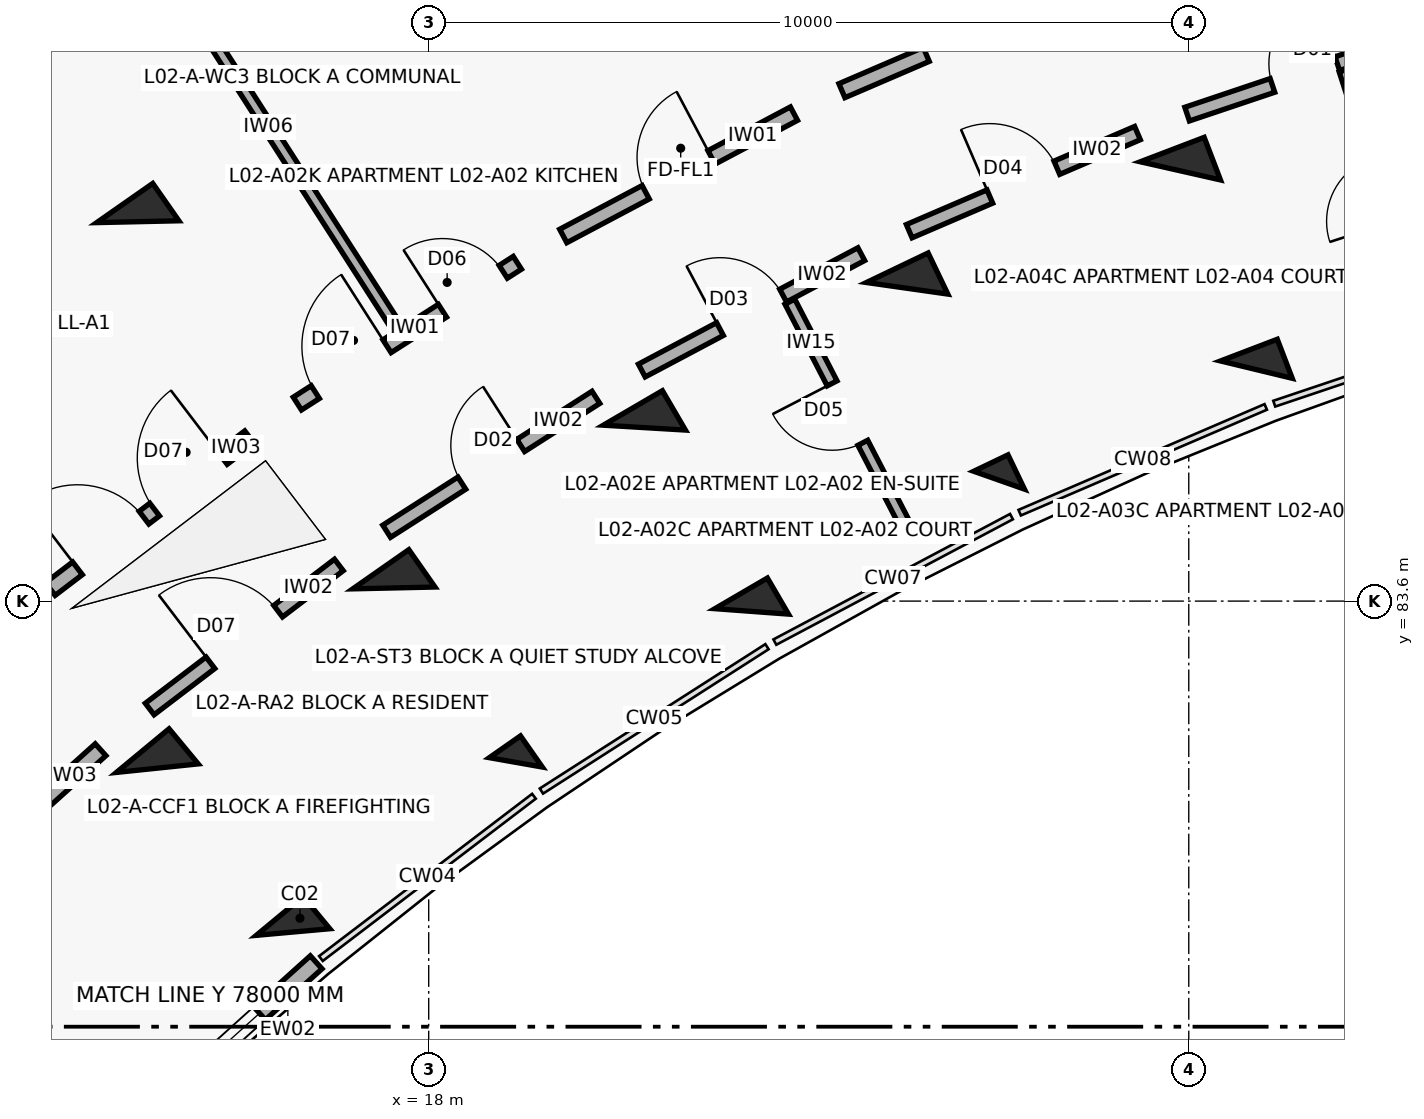
"""IFC4 building model, lengths in metres.
Left out: names, types, materials, properties, quantities, classifications, styles, units other than length and angle.
Written with IfcOpenShell. Run it as: python <this file> out.ifc"""

import sys

from ifc_helpers import new_model, si_unit, direction, frame, frame_2d, origin, origin_2d, place, context, subcontext, project, spatial, rectangle, extrude, element, fill, save


model = new_model("IFC4")
c1 = context("Model", 3, precision=1e-05, world=origin(), true_north=direction((0.0, 1.0)))
c2 = subcontext(c1, "Body", "Model", "MODEL_VIEW")
j1 = project(units=[si_unit("LENGTHUNIT", "METRE"), si_unit("PLANEANGLEUNIT", "RADIAN")], contexts=[c1])
p1 = place(None, origin())
s1 = spatial("IfcSite", under=j1, at=p1, CompositionType="ELEMENT")
p2 = place(p1, origin())
s2 = spatial("IfcBuilding", under=s1, at=p2, CompositionType="ELEMENT")
p3 = place(p2, frame((0.0, 0.0, 8.1)))
s3 = spatial("IfcBuildingStorey", under=s2, at=p3, CompositionType="ELEMENT", Elevation=8.1)
p4 = place(p3, frame((16.215, 79.245, 0.0), z_axis=(0.0, 0.0, 1.0), x_axis=(-0.637961754089, 0.770068049148, 0.0)))
e1 = element("IfcColumn", 1, at=p4, inside=s3, PredefinedType="COLUMN", context=c2, shape_type="SweptSolid", body=[
    extrude(rectangle(XDim=0.55, YDim=0.8, at=origin_2d()), origin(), (0.0, 0.0, 1.0), 3.1),
])
p5 = place(p3, frame((14.429, 81.402, 0.0), z_axis=(0.0, 0.0, 1.0), x_axis=(-0.637961754089, 0.770068049148, 0.0)))
e2 = element("IfcColumn", 2, at=p5, inside=s3, PredefinedType="COLUMN", context=c2, shape_type="SweptSolid", body=[
    extrude(rectangle(XDim=0.6, YDim=0.9, at=origin_2d()), origin(), (0.0, 0.0, 1.0), 3.1),
])
p6 = place(p3, frame((19.146, 81.478, 0.0), z_axis=(0.0, 0.0, 1.0), x_axis=(-0.573004420611, 0.819552276527, 0.0)))
e3 = element("IfcColumn", 3, at=p6, inside=s3, PredefinedType="COLUMN", context=c2, shape_type="SweptSolid", body=[
    extrude(rectangle(XDim=0.5, YDim=0.5, at=origin_2d()), origin(), (0.0, 0.0, 1.0), 3.1),
])
for number, where, z_axis, x_axis in (
    (4, (17.542, 83.773, 0.0), (0.0, 0.0, 1.0), (-0.573, 0.82, 0.0)),
    (5, (14.172, 88.592, 0.0), (0.0, 0.0, 1.0), (-0.573, 0.82, 0.0)),
):
    element("IfcColumn", number, at=place(p3, frame(where, z_axis=z_axis, x_axis=x_axis)), inside=s3, PredefinedType="COLUMN", context=c2, shape_type="SweptSolid", body=[
        extrude(rectangle(XDim=0.6, YDim=0.9, at=origin_2d()), origin(), (0.0, 0.0, 1.0), 3.1),
    ])
p7 = place(p3, frame((22.249, 83.464, 0.0), z_axis=(0.0, 0.0, 1.0), x_axis=(-0.504226211181, 0.863571611366, 0.0)))
e6 = element("IfcColumn", 6, at=p7, inside=s3, PredefinedType="COLUMN", context=c2, shape_type="SweptSolid", body=[
    extrude(rectangle(XDim=0.55, YDim=0.8, at=origin_2d()), origin(), (0.0, 0.0, 1.0), 3.1),
])
for number, where, z_axis, x_axis in (
    (7, (20.837, 85.882, 0.0), (0.0, 0.0, 1.0), (-0.504, 0.864, 0.0)),
    (8, (17.873, 90.96, 0.0), (0.0, 0.0, 1.0), (-0.504, 0.864, 0.0)),
):
    element("IfcColumn", number, at=place(p3, frame(where, z_axis=z_axis, x_axis=x_axis)), inside=s3, PredefinedType="COLUMN", context=c2, shape_type="SweptSolid", body=[
        extrude(rectangle(XDim=0.6, YDim=0.9, at=origin_2d()), origin(), (0.0, 0.0, 1.0), 3.1),
    ])
p8 = place(p3, frame((25.504, 85.191, 0.0), z_axis=(0.0, 0.0, 1.0), x_axis=(-0.432085748802, 0.901832526405, 0.0)))
e9 = element("IfcColumn", 9, at=p8, inside=s3, PredefinedType="COLUMN", context=c2, shape_type="SweptSolid", body=[
    extrude(rectangle(XDim=0.5, YDim=0.5, at=origin_2d()), origin(), (0.0, 0.0, 1.0), 3.1),
])
p9 = place(p3, frame((24.294, 87.716, 0.0), z_axis=(0.0, 0.0, 1.0), x_axis=(-0.432085748802, 0.901832526405, 0.0)))
e10 = element("IfcColumn", 10, at=p9, inside=s3, PredefinedType="COLUMN", context=c2, shape_type="SweptSolid", body=[
    extrude(rectangle(XDim=0.6, YDim=0.9, at=origin_2d()), origin(), (0.0, 0.0, 1.0), 3.1),
])
p10 = place(p3, frame((28.889, 86.646, 0.0), z_axis=(0.0, 0.0, 1.0), x_axis=(-0.357064076459, 0.934079892355, 0.0)))
e11 = element("IfcColumn", 11, at=p10, inside=s3, PredefinedType="COLUMN", context=c2, shape_type="SweptSolid", body=[
    extrude(rectangle(XDim=0.55, YDim=0.8, at=origin_2d()), origin(), (0.0, 0.0, 1.0), 3.1),
])
p11 = place(p3, frame((27.889, 89.261, 0.0), z_axis=(0.0, 0.0, 1.0), x_axis=(-0.357064076459, 0.934079892355, 0.0)))
e12 = element("IfcColumn", 12, at=p11, inside=s3, PredefinedType="COLUMN", context=c2, shape_type="SweptSolid", body=[
    extrude(rectangle(XDim=0.6, YDim=0.9, at=origin_2d()), origin(), (0.0, 0.0, 1.0), 3.1),
])
p12 = place(p3, frame((13.84, 76.437, 0.0), z_axis=(0.0, 0.0, 1.0), x_axis=(0.743385092197, 0.668863666751, 0.0)))
e13 = element("IfcWall", 13, at=p12, inside=s3, PredefinedType="SOLIDWALL", context=c2, shape_type="SweptSolid", body=[
    extrude(rectangle(XDim=3.604, YDim=0.23, at=frame_2d((1.802, 0.0))), origin(), (0.0, 0.0, 1.0), 2.25),
])
p13 = place(p12, frame((1.002, 0.0, 0.32)))
e14 = element("IfcOpeningElement", 14, at=p13, cuts=e13, PredefinedType="OPENING", context=c2, shape_type="SweptSolid", body=[
    extrude(rectangle(XDim=1.6, YDim=1.5, at=frame_2d((0.8, 0.75))), frame((0.0, 0.125, 0.0), z_axis=(0.0, -1.0, 0.0), x_axis=(1.0, 0.0, 0.0)), (0.0, 0.0, 1.0), 0.25),
])
p14 = place(p3, frame((11.357, 79.552, 0.0), z_axis=(0.0, 0.0, 1.0), x_axis=(0.743387266925, 0.668861249718, 0.0)))
e15 = element("IfcWall", 15, at=p14, inside=s3, PredefinedType="SOLIDWALL", context=c2, shape_type="SweptSolid", body=[
    extrude(rectangle(XDim=3.128, YDim=0.21, at=frame_2d((1.564, 0.0))), origin(), (0.0, 0.0, 1.0), 2.08),
])
p15 = place(p14, frame((1.014, 0.0, 0.0)))
e16 = element("IfcOpeningElement", 16, at=p15, cuts=e15, PredefinedType="OPENING", context=c2, shape_type="SweptSolid", body=[
    extrude(rectangle(XDim=1.1, YDim=2.15, at=frame_2d((0.55, 1.075))), frame((0.0, 0.115, 0.0), z_axis=(0.0, -1.0, 0.0), x_axis=(1.0, 0.0, 0.0)), (0.0, 0.0, 1.0), 0.23),
])
p16 = place(p3, frame((13.021, 83.759, 0.0), z_axis=(0.0, 0.0, 1.0), x_axis=(0.795498026433, 0.605956178235, 0.0)))
e17 = element("IfcWall", 17, at=p16, inside=s3, PredefinedType="SOLIDWALL", context=c2, shape_type="SweptSolid", body=[
    extrude(rectangle(XDim=3.296, YDim=0.21, at=frame_2d((1.648, 0.0))), origin(), (0.0, 0.0, 1.0), 2.08),
])
p17 = place(p16, frame((0.45, 0.0, 0.0)))
e18 = element("IfcOpeningElement", 18, at=p17, cuts=e17, PredefinedType="OPENING", context=c2, shape_type="SweptSolid", body=[
    extrude(rectangle(XDim=1.1, YDim=2.15, at=frame_2d((0.55, 1.075))), frame((0.0, 0.115, 0.0), z_axis=(0.0, -1.0, 0.0), x_axis=(1.0, 0.0, 0.0)), (0.0, 0.0, 1.0), 0.23),
])
p18 = place(p16, frame((1.726, 0.0, 0.0)))
e19 = element("IfcOpeningElement", 19, at=p18, cuts=e17, PredefinedType="OPENING", context=c2, shape_type="SweptSolid", body=[
    extrude(rectangle(XDim=1.12, YDim=2.15, at=frame_2d((0.56, 1.075))), frame((0.0, 0.115, 0.0), z_axis=(0.0, -1.0, 0.0), x_axis=(1.0, 0.0, 0.0)), (0.0, 0.0, 1.0), 0.23),
])
p19 = place(p3, frame((14.329, 82.18, 0.0), z_axis=(0.0, 0.0, 1.0), x_axis=(0.795501577908, 0.605951515838, 0.0)))
e20 = element("IfcWall", 20, at=p19, inside=s3, PredefinedType="SOLIDWALL", context=c2, shape_type="SweptSolid", body=[
    extrude(rectangle(XDim=3.129, YDim=0.19, at=frame_2d((1.564, 0.0))), origin(), (0.0, 0.0, 1.0), 2.08),
])
p20 = place(p19, frame((1.004, 0.0, 0.0)))
e21 = element("IfcOpeningElement", 21, at=p20, cuts=e20, PredefinedType="OPENING", context=c2, shape_type="SweptSolid", body=[
    extrude(rectangle(XDim=1.12, YDim=2.15, at=frame_2d((0.56, 1.075))), frame((0.0, 0.105, 0.0), z_axis=(0.0, -1.0, 0.0), x_axis=(1.0, 0.0, 0.0)), (0.0, 0.0, 1.0), 0.21),
])
p21 = place(p3, frame((16.272, 86.199, 0.0), z_axis=(0.0, 0.0, 1.0), x_axis=(0.842257205985, 0.539075874963, 0.0)))
e22 = element("IfcWall", 22, at=p21, inside=s3, PredefinedType="SOLIDWALL", context=c2, shape_type="SweptSolid", body=[
    extrude(rectangle(XDim=3.436, YDim=0.2, at=frame_2d((1.718, 0.0))), origin(), (0.0, 0.0, 1.0), 2.08),
])
p22 = place(p21, frame((0.28, 0.0, 0.0)))
e23 = element("IfcOpeningElement", 23, at=p22, cuts=e22, PredefinedType="OPENING", context=c2, shape_type="SweptSolid", body=[
    extrude(rectangle(XDim=1.12, YDim=2.15, at=frame_2d((0.56, 1.075))), frame((0.0, 0.11, 0.0), z_axis=(0.0, -1.0, 0.0), x_axis=(1.0, 0.0, 0.0)), (0.0, 0.0, 1.0), 0.22),
])
p23 = place(p21, frame((2.266, 0.0, 0.0)))
e24 = element("IfcOpeningElement", 24, at=p23, cuts=e22, PredefinedType="OPENING", context=c2, shape_type="SweptSolid", body=[
    extrude(rectangle(XDim=0.95, YDim=2.1, at=frame_2d((0.475, 1.05))), frame((0.0, 0.11, 0.0), z_axis=(0.0, -1.0, 0.0), x_axis=(1.0, 0.0, 0.0)), (0.0, 0.0, 1.0), 0.22),
])
p24 = place(p3, frame((17.447, 84.519, 0.0), z_axis=(0.0, 0.0, 1.0), x_axis=(0.842225276846, 0.539125758095, 0.0)))
e25 = element("IfcWall", 25, at=p24, inside=s3, PredefinedType="SOLIDWALL", context=c2, shape_type="SweptSolid", body=[
    extrude(rectangle(XDim=3.269, YDim=0.19, at=frame_2d((1.634, 0.0))), origin(), (0.0, 0.0, 1.0), 2.08),
])
p25 = place(p24, frame((1.174, 0.0, 0.0)))
e26 = element("IfcOpeningElement", 26, at=p25, cuts=e25, PredefinedType="OPENING", context=c2, shape_type="SweptSolid", body=[
    extrude(rectangle(XDim=0.92, YDim=2.1, at=frame_2d((0.46, 1.05))), frame((0.0, 0.105, 0.0), z_axis=(0.0, -1.0, 0.0), x_axis=(1.0, 0.0, 0.0)), (0.0, 0.0, 1.0), 0.21),
])
p26 = place(p3, frame((17.524, 87.288, 0.0), z_axis=(0.0, 0.0, 1.0), x_axis=(-0.540338452216, 0.841447774408, 0.0)))
e27 = element("IfcWall", 27, at=p26, inside=s3, PredefinedType="PARTITIONING", context=c2, shape_type="SweptSolid", body=[
    extrude(rectangle(XDim=7.95, YDim=0.14, at=frame_2d((3.975, 0.0))), origin(), (0.0, 0.0, 1.0), 2.08),
])
p27 = place(p26, frame((6.05, 0.0, 0.0)))
e28 = element("IfcOpeningElement", 28, at=p27, cuts=e27, PredefinedType="OPENING", context=c2, shape_type="SweptSolid", body=[
    extrude(rectangle(XDim=0.92, YDim=2.1, at=frame_2d((0.46, 1.05))), frame((0.0, 0.08, 0.0), z_axis=(0.0, -1.0, 0.0), x_axis=(1.0, 0.0, 0.0)), (0.0, 0.0, 1.0), 0.16),
])
p28 = place(p3, frame((19.77, 88.404, 0.0), z_axis=(0.0, 0.0, 1.0), x_axis=(0.883410853063, 0.468599258099, 0.0)))
e29 = element("IfcWall", 29, at=p28, inside=s3, PredefinedType="SOLIDWALL", context=c2, shape_type="SweptSolid", body=[
    extrude(rectangle(XDim=3.436, YDim=0.2, at=frame_2d((1.718, 0.0))), origin(), (0.0, 0.0, 1.0), 2.08),
])
p29 = place(p28, frame((1.228, 0.0, 0.0)))
e30 = element("IfcOpeningElement", 30, at=p29, cuts=e29, PredefinedType="OPENING", context=c2, shape_type="SweptSolid", body=[
    extrude(rectangle(XDim=0.98, YDim=2.15, at=frame_2d((0.49, 1.075))), frame((0.0, 0.11, 0.0), z_axis=(0.0, -1.0, 0.0), x_axis=(1.0, 0.0, 0.0)), (0.0, 0.0, 1.0), 0.22),
])
p30 = place(p3, frame((20.804, 86.634, 0.0), z_axis=(0.0, 0.0, 1.0), x_axis=(0.883444301944, 0.468536194293, 0.0)))
e31 = element("IfcWall", 31, at=p30, inside=s3, PredefinedType="SOLIDWALL", context=c2, shape_type="SweptSolid", body=[
    extrude(rectangle(XDim=3.269, YDim=0.19, at=frame_2d((1.634, 0.0))), origin(), (0.0, 0.0, 1.0), 2.08),
])
p31 = place(p30, frame((1.164, 0.0, 0.0)))
e32 = element("IfcOpeningElement", 32, at=p31, cuts=e31, PredefinedType="OPENING", context=c2, shape_type="SweptSolid", body=[
    extrude(rectangle(XDim=0.94, YDim=2.1, at=frame_2d((0.47, 1.05))), frame((0.0, 0.105, 0.0), z_axis=(0.0, -1.0, 0.0), x_axis=(1.0, 0.0, 0.0)), (0.0, 0.0, 1.0), 0.21),
])
p32 = place(p3, frame((24.267, 84.608, 0.0), z_axis=(0.0, 0.0, 1.0), x_axis=(-0.459217611894, 0.888323806349, 0.0)))
e33 = element("IfcWall", 33, at=p32, inside=s3, PredefinedType="PARTITIONING", context=c2, shape_type="SweptSolid", body=[
    extrude(rectangle(XDim=3.3, YDim=0.145, at=frame_2d((1.65, 0.0))), origin(), (0.0, 0.0, 1.0), 2.08),
])
p33 = place(p32, frame((1.21, 0.0, 0.0)))
e34 = element("IfcOpeningElement", 34, at=p33, cuts=e33, PredefinedType="OPENING", context=c2, shape_type="SweptSolid", body=[
    extrude(rectangle(XDim=0.88, YDim=2.1, at=frame_2d((0.44, 1.05))), frame((0.0, 0.083, 0.0), z_axis=(0.0, -1.0, 0.0), x_axis=(1.0, 0.0, 0.0)), (0.0, 0.0, 1.0), 0.165),
])
p34 = place(p3, frame((23.437, 90.316, 0.0), z_axis=(0.0, 0.0, 1.0), x_axis=(0.918718172399, 0.394913813008, 0.0)))
e35 = element("IfcWall", 35, at=p34, inside=s3, PredefinedType="SOLIDWALL", context=c2, shape_type="SweptSolid", body=[
    extrude(rectangle(XDim=3.436, YDim=0.2, at=frame_2d((1.718, 0.0))), origin(), (0.0, 0.0, 1.0), 2.08),
])
p35 = place(p34, frame((1.208, 0.0, 0.0)))
e36 = element("IfcOpeningElement", 36, at=p35, cuts=e35, PredefinedType="OPENING", context=c2, shape_type="SweptSolid", body=[
    extrude(rectangle(XDim=1.02, YDim=2.15, at=frame_2d((0.51, 1.075))), frame((0.0, 0.11, 0.0), z_axis=(0.0, -1.0, 0.0), x_axis=(1.0, 0.0, 0.0)), (0.0, 0.0, 1.0), 0.22),
])
p36 = place(p3, frame((24.322, 88.467, 0.0), z_axis=(0.0, 0.0, 1.0), x_axis=(0.918723391052, 0.394901672235, 0.0)))
e37 = element("IfcWall", 37, at=p36, inside=s3, PredefinedType="SOLIDWALL", context=c2, shape_type="SweptSolid", body=[
    extrude(rectangle(XDim=3.269, YDim=0.19, at=frame_2d((1.634, 0.0))), origin(), (0.0, 0.0, 1.0), 2.08),
])
p37 = place(p36, frame((1.154, 0.0, 0.0)))
e38 = element("IfcOpeningElement", 38, at=p37, cuts=e37, PredefinedType="OPENING", context=c2, shape_type="SweptSolid", body=[
    extrude(rectangle(XDim=0.96, YDim=2.1, at=frame_2d((0.48, 1.05))), frame((0.0, 0.105, 0.0), z_axis=(0.0, -1.0, 0.0), x_axis=(1.0, 0.0, 0.0)), (0.0, 0.0, 1.0), 0.21),
])
p38 = place(p3, frame((27.979, 90.008, 0.0), z_axis=(0.0, 0.0, 1.0), x_axis=(0.94787351033, 0.318646839643, 0.0)))
e39 = element("IfcWall", 39, at=p38, inside=s3, PredefinedType="SOLIDWALL", context=c2, shape_type="SweptSolid", body=[
    extrude(rectangle(XDim=3.269, YDim=0.19, at=frame_2d((1.634, 0.0))), origin(), (0.0, 0.0, 1.0), 2.08),
])
p39 = place(p38, frame((1.184, 0.0, 0.0)))
e40 = element("IfcOpeningElement", 40, at=p39, cuts=e39, PredefinedType="OPENING", context=c2, shape_type="SweptSolid", body=[
    extrude(rectangle(XDim=0.9, YDim=2.1, at=frame_2d((0.45, 1.05))), frame((0.0, 0.105, 0.0), z_axis=(0.0, -1.0, 0.0), x_axis=(1.0, 0.0, 0.0)), (0.0, 0.0, 1.0), 0.21),
])
p40 = place(p3, frame((31.066, 87.446, 0.0), z_axis=(0.0, 0.0, 1.0), x_axis=(-0.308582493915, 0.951197584337, 0.0)))
e41 = element("IfcWall", 41, at=p40, inside=s3, PredefinedType="PARTITIONING", context=c2, shape_type="SweptSolid", body=[
    extrude(rectangle(XDim=3.3, YDim=0.145, at=frame_2d((1.65, 0.0))), origin(), (0.0, 0.0, 1.0), 2.08),
])
p41 = place(p40, frame((1.21, 0.0, 0.0)))
e42 = element("IfcOpeningElement", 42, at=p41, cuts=e41, PredefinedType="OPENING", context=c2, shape_type="SweptSolid", body=[
    extrude(rectangle(XDim=0.88, YDim=2.1, at=frame_2d((0.44, 1.05))), frame((0.0, 0.083, 0.0), z_axis=(0.0, -1.0, 0.0), x_axis=(1.0, 0.0, 0.0)), (0.0, 0.0, 1.0), 0.165),
])
p42 = place(p13, origin())
e43 = element("IfcWindow", 43, at=p42, inside=s3, PartitioningType="DOUBLE_PANEL_VERTICAL", PredefinedType="WINDOW", context=c2, shape_type="SweptSolid", body=[
    extrude(rectangle(XDim=1.6, YDim=1.5, at=frame_2d((0.8, 0.75))), frame((0.0, 0.03, 0.0), z_axis=(0.0, -1.0, 0.0), x_axis=(1.0, 0.0, 0.0)), (0.0, 0.0, 1.0), 0.06),
])
fill(e14, e43)
p43 = place(p17, origin())
e44 = element("IfcDoor", 44, at=p43, inside=s3, OperationType="SINGLE_SWING_LEFT", PredefinedType="DOOR", context=c2, shape_type="SweptSolid", body=[
    extrude(rectangle(XDim=1.1, YDim=2.15, at=frame_2d((0.55, 1.075))), frame((0.0, 0.025, 0.0), z_axis=(0.0, -1.0, 0.0), x_axis=(1.0, 0.0, 0.0)), (0.0, 0.0, 1.0), 0.05),
])
fill(e18, e44)
p44 = place(p18, origin())
e45 = element("IfcDoor", 45, at=p44, inside=s3, OperationType="SINGLE_SWING_RIGHT", PredefinedType="DOOR", context=c2, shape_type="SweptSolid", body=[
    extrude(rectangle(XDim=1.12, YDim=2.15, at=frame_2d((0.56, 1.075))), frame((0.0, 0.025, 0.0), z_axis=(0.0, -1.0, 0.0), x_axis=(1.0, 0.0, 0.0)), (0.0, 0.0, 1.0), 0.05),
])
fill(e19, e45)
p45 = place(p20, origin())
e46 = element("IfcDoor", 46, at=p45, inside=s3, OperationType="SINGLE_SWING_LEFT", PredefinedType="DOOR", context=c2, shape_type="SweptSolid", body=[
    extrude(rectangle(XDim=1.12, YDim=2.15, at=frame_2d((0.56, 1.075))), frame((0.0, 0.025, 0.0), z_axis=(0.0, -1.0, 0.0), x_axis=(1.0, 0.0, 0.0)), (0.0, 0.0, 1.0), 0.05),
])
fill(e21, e46)
p46 = place(p22, origin())
e47 = element("IfcDoor", 47, at=p46, inside=s3, OperationType="SINGLE_SWING_RIGHT", PredefinedType="DOOR", context=c2, shape_type="SweptSolid", body=[
    extrude(rectangle(XDim=1.12, YDim=2.15, at=frame_2d((0.56, 1.075))), frame((0.0, 0.025, 0.0), z_axis=(0.0, -1.0, 0.0), x_axis=(1.0, 0.0, 0.0)), (0.0, 0.0, 1.0), 0.05),
])
fill(e23, e47)
p47 = place(p23, origin())
e48 = element("IfcDoor", 48, at=p47, inside=s3, OperationType="SINGLE_SWING_LEFT", PredefinedType="DOOR", context=c2, shape_type="SweptSolid", body=[
    extrude(rectangle(XDim=0.95, YDim=2.1, at=frame_2d((0.475, 1.05))), frame((0.0, 0.025, 0.0), z_axis=(0.0, -1.0, 0.0), x_axis=(1.0, 0.0, 0.0)), (0.0, 0.0, 1.0), 0.05),
])
fill(e24, e48)
p48 = place(p25, origin())
e49 = element("IfcDoor", 49, at=p48, inside=s3, OperationType="SINGLE_SWING_RIGHT", PredefinedType="DOOR", context=c2, shape_type="SweptSolid", body=[
    extrude(rectangle(XDim=0.92, YDim=2.1, at=frame_2d((0.46, 1.05))), frame((0.0, 0.025, 0.0), z_axis=(0.0, -1.0, 0.0), x_axis=(1.0, 0.0, 0.0)), (0.0, 0.0, 1.0), 0.05),
])
fill(e26, e49)
p49 = place(p29, origin())
e50 = element("IfcDoor", 50, at=p49, inside=s3, OperationType="SINGLE_SWING_RIGHT", PredefinedType="DOOR", context=c2, shape_type="SweptSolid", body=[
    extrude(rectangle(XDim=0.98, YDim=2.15, at=frame_2d((0.49, 1.075))), frame((0.0, 0.025, 0.0), z_axis=(0.0, -1.0, 0.0), x_axis=(1.0, 0.0, 0.0)), (0.0, 0.0, 1.0), 0.05),
])
fill(e30, e50)
p50 = place(p31, origin())
e51 = element("IfcDoor", 51, at=p50, inside=s3, OperationType="SINGLE_SWING_LEFT", PredefinedType="DOOR", context=c2, shape_type="SweptSolid", body=[
    extrude(rectangle(XDim=0.94, YDim=2.1, at=frame_2d((0.47, 1.05))), frame((0.0, 0.025, 0.0), z_axis=(0.0, -1.0, 0.0), x_axis=(1.0, 0.0, 0.0)), (0.0, 0.0, 1.0), 0.05),
])
fill(e32, e51)
p51 = place(p33, origin())
e52 = element("IfcDoor", 52, at=p51, inside=s3, OperationType="SINGLE_SWING_RIGHT", PredefinedType="DOOR", context=c2, shape_type="SweptSolid", body=[
    extrude(rectangle(XDim=0.88, YDim=2.1, at=frame_2d((0.44, 1.05))), frame((0.0, 0.025, 0.0), z_axis=(0.0, -1.0, 0.0), x_axis=(1.0, 0.0, 0.0)), (0.0, 0.0, 1.0), 0.05),
])
fill(e34, e52)
p52 = place(p35, origin())
e53 = element("IfcDoor", 53, at=p52, inside=s3, OperationType="SINGLE_SWING_RIGHT", PredefinedType="DOOR", context=c2, shape_type="SweptSolid", body=[
    extrude(rectangle(XDim=1.02, YDim=2.15, at=frame_2d((0.51, 1.075))), frame((0.0, 0.025, 0.0), z_axis=(0.0, -1.0, 0.0), x_axis=(1.0, 0.0, 0.0)), (0.0, 0.0, 1.0), 0.05),
])
fill(e36, e53)
p53 = place(p37, origin())
e54 = element("IfcDoor", 54, at=p53, inside=s3, OperationType="SINGLE_SWING_LEFT", PredefinedType="DOOR", context=c2, shape_type="SweptSolid", body=[
    extrude(rectangle(XDim=0.96, YDim=2.1, at=frame_2d((0.48, 1.05))), frame((0.0, 0.025, 0.0), z_axis=(0.0, -1.0, 0.0), x_axis=(1.0, 0.0, 0.0)), (0.0, 0.0, 1.0), 0.05),
])
fill(e38, e54)
p54 = place(p39, origin())
e55 = element("IfcDoor", 55, at=p54, inside=s3, OperationType="SINGLE_SWING_RIGHT", PredefinedType="DOOR", context=c2, shape_type="SweptSolid", body=[
    extrude(rectangle(XDim=0.9, YDim=2.1, at=frame_2d((0.45, 1.05))), frame((0.0, 0.025, 0.0), z_axis=(0.0, -1.0, 0.0), x_axis=(1.0, 0.0, 0.0)), (0.0, 0.0, 1.0), 0.05),
])
fill(e40, e55)
save(model, sys.argv[1])
